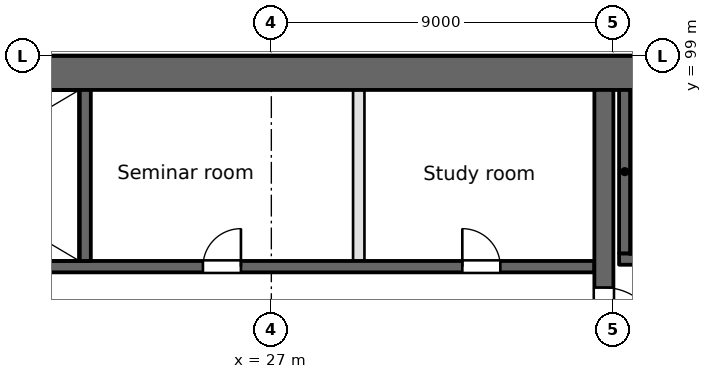
"""IFC4 building model, lengths in metres.
Left out: names, types, materials, properties, quantities, classifications, styles, units other than length and angle.
Written with IfcOpenShell. Run it as: python <this file> out.ifc"""

import sys

from ifc_helpers import new_model, si_unit, direction, frame, frame_2d, origin, place, context, subcontext, project, spatial, rectangle, extrude, element, fill, save


model = new_model("IFC4")
c1 = context("Model", 3, precision=1e-05, world=origin(), true_north=direction((0.0, 1.0)))
c2 = subcontext(c1, "Body", "Model", "MODEL_VIEW")
j1 = project(units=[si_unit("LENGTHUNIT", "METRE"), si_unit("PLANEANGLEUNIT", "RADIAN")], contexts=[c1])
p1 = place(None, origin())
s1 = spatial("IfcSite", under=j1, at=p1, CompositionType="ELEMENT")
p2 = place(p1, origin())
s2 = spatial("IfcBuilding", under=s1, at=p2, CompositionType="ELEMENT")
p3 = place(p2, frame((0.0, 0.0, 65.4)))
s3 = spatial("IfcBuildingStorey", under=s2, at=p3, CompositionType="ELEMENT", Elevation=65.4)
p4 = place(p3, frame((94.5, 98.55, 0.0), z_axis=(0.0, 0.0, 1.0), x_axis=(-1.0, 0.0, 0.0)))
e1 = element("IfcWall", 1, at=p4, inside=s3, PredefinedType="SHEAR", context=c2, shape_type="SweptSolid", body=[
    extrude(rectangle(XDim=90.0, YDim=0.9, at=frame_2d((45.0, 0.0))), origin(), (0.0, 0.0, 1.0), 3.7),
])
p5 = place(p3, frame((0.9, 93.45, -0.4), z_axis=(0.0, 0.0, 1.0), x_axis=(1.0, 0.0, 0.0)))
e2 = element("IfcWall", 2, at=p5, inside=s3, PredefinedType="SOLIDWALL", context=c2, shape_type="SweptSolid", body=[
    extrude(rectangle(XDim=34.6, YDim=0.3, at=frame_2d((17.3, 0.0))), origin(), (0.0, 0.0, 1.0), 3.7),
])
p6 = place(p5, frame((9.7, 0.0, 0.4)))
e3 = element("IfcOpeningElement", 3, at=p6, cuts=e2, PredefinedType="OPENING", context=c2, shape_type="SweptSolid", body=[
    extrude(rectangle(XDim=1.2, YDim=2.1, at=frame_2d((0.6, 1.05))), frame((0.0, 0.15, 0.0), z_axis=(0.0, -1.0, 0.0), x_axis=(1.0, 0.0, 0.0)), (0.0, 0.0, 1.0), 0.3),
])
p7 = place(p5, frame((24.3, 0.0, 0.4)))
e4 = element("IfcOpeningElement", 4, at=p7, cuts=e2, PredefinedType="OPENING", context=c2, shape_type="SweptSolid", body=[
    extrude(rectangle(XDim=1.0, YDim=2.1, at=frame_2d((0.5, 1.05))), frame((0.0, 0.15, 0.0), z_axis=(0.0, -1.0, 0.0), x_axis=(1.0, 0.0, 0.0)), (0.0, 0.0, 1.0), 0.3),
])
p8 = place(p5, frame((31.125, 0.0, 0.4)))
e5 = element("IfcOpeningElement", 5, at=p8, cuts=e2, PredefinedType="OPENING", context=c2, shape_type="SweptSolid", body=[
    extrude(rectangle(XDim=1.0, YDim=2.1, at=frame_2d((0.5, 1.05))), frame((0.0, 0.15, 0.0), z_axis=(0.0, -1.0, 0.0), x_axis=(1.0, 0.0, 0.0)), (0.0, 0.0, 1.0), 0.3),
])
p9 = place(p3, frame((36.15, 93.65, -0.4), z_axis=(0.0, 0.0, 1.0), x_axis=(1.0, 0.0, 0.0)))
e6 = element("IfcWall", 6, at=p9, inside=s3, PredefinedType="SOLIDWALL", context=c2, shape_type="SweptSolid", body=[
    extrude(rectangle(XDim=8.2, YDim=0.3, at=frame_2d((4.1, 0.0))), origin(), (0.0, 0.0, 1.0), 3.7),
])
p10 = place(p9, frame((0.7, 0.0, 0.4)))
e7 = element("IfcOpeningElement", 7, at=p10, cuts=e6, PredefinedType="OPENING", context=c2, shape_type="SweptSolid", body=[
    extrude(rectangle(XDim=1.2, YDim=2.1, at=frame_2d((0.6, 1.05))), frame((0.0, 0.15, 0.0), z_axis=(0.0, -1.0, 0.0), x_axis=(1.0, 0.0, 0.0)), (0.0, 0.0, 1.0), 0.3),
])
p11 = place(p3, frame((22.1, 93.6, -0.4), z_axis=(0.0, 0.0, 1.0), x_axis=(0.0, 1.0, 0.0)))
e8 = element("IfcWall", 8, at=p11, inside=s3, PredefinedType="SOLIDWALL", context=c2, shape_type="SweptSolid", body=[
    extrude(rectangle(XDim=4.5, YDim=0.3, at=frame_2d((2.25, 0.0))), origin(), (0.0, 0.0, 1.0), 3.7),
])
p12 = place(p3, frame((29.3, 93.6, 0.0), z_axis=(0.0, 0.0, 1.0), x_axis=(0.0, 1.0, 0.0)))
e9 = element("IfcWall", 9, at=p12, inside=s3, PredefinedType="PARTITIONING", context=c2, shape_type="SweptSolid", body=[
    extrude(rectangle(XDim=4.5, YDim=0.3, at=frame_2d((2.25, 0.0))), origin(), (0.0, 0.0, 1.0), 3.3),
])
p13 = place(p3, frame((35.75, 63.5, -0.4), z_axis=(0.0, 0.0, 1.0), x_axis=(0.0, 1.0, 0.0)))
e10 = element("IfcWall", 10, at=p13, inside=s3, PredefinedType="SOLIDWALL", context=c2, shape_type="SweptSolid", body=[
    extrude(rectangle(XDim=34.6, YDim=0.5, at=frame_2d((17.3, 0.0))), origin(), (0.0, 0.0, 1.0), 3.7),
])
p14 = place(p13, frame((9.7, 0.0, 0.4)))
e11 = element("IfcOpeningElement", 11, at=p14, cuts=e10, PredefinedType="OPENING", context=c2, shape_type="SweptSolid", body=[
    extrude(rectangle(XDim=2.4, YDim=2.1, at=frame_2d((1.2, 1.05))), frame((0.0, 0.25, 0.0), z_axis=(0.0, -1.0, 0.0), x_axis=(1.0, 0.0, 0.0)), (0.0, 0.0, 1.0), 0.5),
])
p15 = place(p13, frame((27.9, 0.0, 0.4)))
e12 = element("IfcOpeningElement", 12, at=p15, cuts=e10, PredefinedType="OPENING", context=c2, shape_type="SweptSolid", body=[
    extrude(rectangle(XDim=1.5, YDim=2.1, at=frame_2d((0.75, 1.05))), frame((0.0, 0.25, 0.0), z_axis=(0.0, -1.0, 0.0), x_axis=(1.0, 0.0, 0.0)), (0.0, 0.0, 1.0), 0.5),
])
p16 = place(p13, frame((1.5, 0.0, 0.4)))
e13 = element("IfcOpeningElement", 13, at=p16, cuts=e10, PredefinedType="OPENING", context=c2, shape_type="SweptSolid", body=[
    extrude(rectangle(XDim=1.2, YDim=2.1, at=frame_2d((0.6, 1.05))), frame((0.0, 0.25, 0.0), z_axis=(0.0, -1.0, 0.0), x_axis=(1.0, 0.0, 0.0)), (0.0, 0.0, 1.0), 0.5),
])
p17 = place(p3, frame((36.3, 93.8, -0.4), z_axis=(0.0, 0.0, 1.0), x_axis=(0.0, 1.0, 0.0)))
e14 = element("IfcWall", 14, at=p17, inside=s3, PredefinedType="SOLIDWALL", context=c2, shape_type="SweptSolid", body=[
    extrude(rectangle(XDim=4.3, YDim=0.3, at=frame_2d((2.15, 0.0))), origin(), (0.0, 0.0, 1.0), 3.7),
])
p18 = place(p15, frame((1.5, 0.0, 0.0), z_axis=(0.0, 0.0, 1.0), x_axis=(-1.0, 0.0, 0.0)))
e15 = element("IfcDoor", 15, at=p18, inside=s3, OperationType="SINGLE_SWING_RIGHT", PredefinedType="DOOR", context=c2, shape_type="SweptSolid", body=[
    extrude(rectangle(XDim=1.5, YDim=2.1, at=frame_2d((0.75, 1.05))), frame((0.0, 0.025, 0.0), z_axis=(0.0, -1.0, 0.0), x_axis=(1.0, 0.0, 0.0)), (0.0, 0.0, 1.0), 0.05),
])
fill(e12, e15)
p19 = place(p7, origin())
e16 = element("IfcDoor", 16, at=p19, inside=s3, OperationType="SINGLE_SWING_RIGHT", PredefinedType="DOOR", context=c2, shape_type="SweptSolid", body=[
    extrude(rectangle(XDim=1.0, YDim=2.1, at=frame_2d((0.5, 1.05))), frame((0.0, 0.025, 0.0), z_axis=(0.0, -1.0, 0.0), x_axis=(1.0, 0.0, 0.0)), (0.0, 0.0, 1.0), 0.05),
])
fill(e4, e16)
p20 = place(p8, origin())
e17 = element("IfcDoor", 17, at=p20, inside=s3, OperationType="SINGLE_SWING_LEFT", PredefinedType="DOOR", context=c2, shape_type="SweptSolid", body=[
    extrude(rectangle(XDim=1.0, YDim=2.1, at=frame_2d((0.5, 1.05))), frame((0.0, 0.025, 0.0), z_axis=(0.0, -1.0, 0.0), x_axis=(1.0, 0.0, 0.0)), (0.0, 0.0, 1.0), 0.05),
])
fill(e5, e17)
save(model, sys.argv[1])
